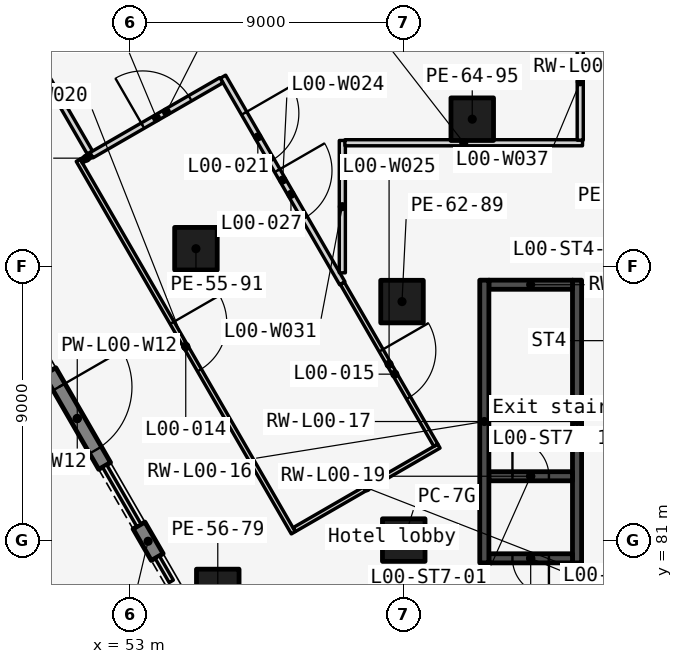
"""IFC4 building model, lengths in metres.
Left out: names, types, materials, properties, quantities, classifications, styles, units other than length and angle.
Written with IfcOpenShell. Run it as: python <this file> out.ifc"""

import sys

from ifc_helpers import new_model, si_unit, direction, frame, frame_2d, origin, origin_2d, place, context, subcontext, project, spatial, rectangle, extrude, element, fill, save


model = new_model("IFC4")
c1 = context("Model", 3, precision=1e-05, world=origin(), true_north=direction((0.0, 1.0)))
c2 = subcontext(c1, "Body", "Model", "MODEL_VIEW")
j1 = project(units=[si_unit("LENGTHUNIT", "METRE"), si_unit("PLANEANGLEUNIT", "RADIAN")], contexts=[c1])
p1 = place(None, origin())
s1 = spatial("IfcSite", under=j1, at=p1, CompositionType="ELEMENT")
p2 = place(p1, origin())
s2 = spatial("IfcBuilding", under=s1, at=p2, CompositionType="ELEMENT")
p3 = place(p2, origin())
s3 = spatial("IfcBuildingStorey", under=s2, at=p3, CompositionType="ELEMENT", Elevation=0.0)
for number, where, z_axis, x_axis in (
    (1, (62.0, 81.0, 0.0), (0.0, 0.0, 1.0), (1.0, 0.0, 0.0)),
    (2, (55.165, 90.585, 0.0), (0.0, 0.0, 1.0), (1.0, 0.0, 0.0)),
    (3, (55.883, 79.343, 0.0), (0.0, 0.0, 1.0), (1.0, 0.0, 0.0)),
    (4, (61.943, 88.845, 0.0), (0.0, 0.0, 1.0), (1.0, 0.0, 0.0)),
    (5, (64.253, 94.845, 0.0), (0.0, 0.0, 1.0), (1.0, 0.0, 0.0)),
):
    element("IfcColumn", number, at=place(p3, frame(where, z_axis=z_axis, x_axis=x_axis)), inside=s3, PredefinedType="COLUMN", context=c2, shape_type="SweptSolid", body=[
        extrude(rectangle(XDim=1.4, YDim=1.4, at=origin_2d()), origin(), (0.0, 0.0, 1.0), 7.5),
    ])
for number, where, z_axis, x_axis in (
    (6, (64.65, 80.25, 0.0), (0.0, 0.0, 1.0), (0.0, 1.0, 0.0)),
    (7, (67.7, 80.25, 0.0), (0.0, 0.0, 1.0), (0.0, 1.0, 0.0)),
):
    element("IfcWall", number, at=place(p3, frame(where, z_axis=z_axis, x_axis=x_axis)), inside=s3, PredefinedType="SOLIDWALL", context=c2, shape_type="SweptSolid", body=[
        extrude(rectangle(XDim=9.3, YDim=0.3, at=frame_2d((4.65, 0.0))), origin(), (0.0, 0.0, 1.0), 7.2),
    ])
p4 = place(p3, frame((64.8, 80.4, 0.0), z_axis=(0.0, 0.0, 1.0), x_axis=(1.0, 0.0, 0.0)))
e8 = element("IfcWall", 8, at=p4, inside=s3, PredefinedType="SOLIDWALL", context=c2, shape_type="SweptSolid", body=[
    extrude(rectangle(XDim=2.75, YDim=0.3, at=frame_2d((1.375, 0.0))), origin(), (0.0, 0.0, 1.0), 7.2),
])
p5 = place(p4, frame((0.775, 0.0, 0.0)))
e9 = element("IfcOpeningElement", 9, at=p5, cuts=e8, PredefinedType="OPENING", context=c2, shape_type="SweptSolid", body=[
    extrude(rectangle(XDim=1.2, YDim=2.1, at=frame_2d((0.6, 1.05))), frame((0.0, 0.16, 0.0), z_axis=(0.0, -1.0, 0.0), x_axis=(1.0, 0.0, 0.0)), (0.0, 0.0, 1.0), 0.32),
])
p6 = place(p3, frame((64.8, 83.1, 0.0), z_axis=(0.0, 0.0, 1.0), x_axis=(1.0, 0.0, 0.0)))
e10 = element("IfcWall", 10, at=p6, inside=s3, PredefinedType="SOLIDWALL", context=c2, shape_type="SweptSolid", body=[
    extrude(rectangle(XDim=2.75, YDim=0.3, at=frame_2d((1.375, 0.0))), origin(), (0.0, 0.0, 1.0), 7.2),
])
p7 = place(p6, frame((0.775, 0.0, 0.0)))
e11 = element("IfcOpeningElement", 11, at=p7, cuts=e10, PredefinedType="OPENING", context=c2, shape_type="SweptSolid", body=[
    extrude(rectangle(XDim=1.2, YDim=2.1, at=frame_2d((0.6, 1.05))), frame((0.0, 0.16, 0.0), z_axis=(0.0, -1.0, 0.0), x_axis=(1.0, 0.0, 0.0)), (0.0, 0.0, 1.0), 0.32),
])
p8 = place(p3, frame((64.8, 89.4, 0.0), z_axis=(0.0, 0.0, 1.0), x_axis=(1.0, 0.0, 0.0)))
e12 = element("IfcWall", 12, at=p8, inside=s3, PredefinedType="SOLIDWALL", context=c2, shape_type="SweptSolid", body=[
    extrude(rectangle(XDim=2.75, YDim=0.3, at=frame_2d((1.375, 0.0))), origin(), (0.0, 0.0, 1.0), 7.2),
])
p9 = place(p3, frame((50.361, 86.557, -0.3), z_axis=(0.0, 0.0, 1.0), x_axis=(0.500012057535, -0.866018442252, 0.0)))
e13 = element("IfcWall", 13, at=p9, inside=s3, PredefinedType="SOLIDWALL", context=c2, shape_type="SweptSolid", body=[
    extrude(rectangle(XDim=3.6, YDim=0.45, at=frame_2d((1.8, 0.0))), origin(), (0.0, 0.0, 1.0), 6.812),
])
p10 = place(p9, frame((0.6, 0.0, 0.3)))
e14 = element("IfcOpeningElement", 14, at=p10, cuts=e13, PredefinedType="OPENING", context=c2, shape_type="SweptSolid", body=[
    extrude(rectangle(XDim=2.4, YDim=3.0, at=frame_2d((1.2, 1.5))), frame((0.0, 0.235, 0.0), z_axis=(0.0, -1.0, 0.0), x_axis=(1.0, 0.0, 0.0)), (0.0, 0.0, 1.0), 0.47),
])
p11 = place(p3, frame((53.292, 81.481, -0.3), z_axis=(0.0, 0.0, 1.0), x_axis=(0.499880961361, -0.866094119867, 0.0)))
e15 = element("IfcWall", 15, at=p11, inside=s3, PredefinedType="SOLIDWALL", context=c2, shape_type="SweptSolid", body=[
    extrude(rectangle(XDim=1.2, YDim=0.45, at=frame_2d((0.6, 0.0))), origin(), (0.0, 0.0, 1.0), 6.812),
])
p12 = place(p3, frame((51.292, 93.494, 0.0), z_axis=(0.0, 0.0, 1.0), x_axis=(0.500006218857, -0.866021813296, 0.0)))
e16 = element("IfcWall", 16, at=p12, inside=s3, PredefinedType="PARTITIONING", context=c2, shape_type="SweptSolid", body=[
    extrude(rectangle(XDim=14.15, YDim=0.15, at=frame_2d((7.075, 0.0))), origin(), (0.0, 0.0, 1.0), 7.2),
])
p13 = place(p12, frame((6.175, 0.0, 0.0)))
e17 = element("IfcOpeningElement", 17, at=p13, cuts=e16, PredefinedType="OPENING", context=c2, shape_type="SweptSolid", body=[
    extrude(rectangle(XDim=1.8, YDim=2.1, at=frame_2d((0.9, 1.05))), frame((0.0, 0.085, 0.0), z_axis=(0.0, -1.0, 0.0), x_axis=(1.0, 0.0, 0.0)), (0.0, 0.0, 1.0), 0.17),
])
p14 = place(p3, frame((58.403, 81.347, 0.0), z_axis=(0.0, 0.0, 1.0), x_axis=(0.866012292785, 0.50002270823, 0.0)))
e18 = element("IfcWall", 18, at=p14, inside=s3, PredefinedType="PARTITIONING", context=c2, shape_type="SweptSolid", body=[
    extrude(rectangle(XDim=5.49, YDim=0.15, at=frame_2d((2.745, 0.0))), origin(), (0.0, 0.0, 1.0), 7.2),
])
p15 = place(p3, frame((56.055, 96.244, 0.0), z_axis=(0.0, 0.0, 1.0), x_axis=(0.500009653465, -0.866019830282, 0.0)))
e19 = element("IfcWall", 19, at=p15, inside=s3, PredefinedType="PARTITIONING", context=c2, shape_type="SweptSolid", body=[
    extrude(rectangle(XDim=7.849, YDim=0.2, at=frame_2d((3.924, 0.0))), origin(), (0.0, 0.0, 1.0), 7.2),
])
p16 = place(p15, frame((1.39, 0.0, 0.0)))
e20 = element("IfcOpeningElement", 20, at=p16, cuts=e19, PredefinedType="OPENING", context=c2, shape_type="SweptSolid", body=[
    extrude(rectangle(XDim=1.8, YDim=2.1, at=frame_2d((0.9, 1.05))), frame((0.0, 0.11, 0.0), z_axis=(0.0, -1.0, 0.0), x_axis=(1.0, 0.0, 0.0)), (0.0, 0.0, 1.0), 0.22),
])
p17 = place(p15, frame((3.569, 0.0, 0.0)))
e21 = element("IfcOpeningElement", 21, at=p17, cuts=e19, PredefinedType="OPENING", context=c2, shape_type="SweptSolid", body=[
    extrude(rectangle(XDim=1.8, YDim=2.1, at=frame_2d((0.9, 1.05))), frame((0.0, 0.11, 0.0), z_axis=(0.0, -1.0, 0.0), x_axis=(1.0, 0.0, 0.0)), (0.0, 0.0, 1.0), 0.22),
])
p18 = place(p3, frame((59.98, 89.446, 0.0), z_axis=(0.0, 0.0, 1.0), x_axis=(0.499981299016, -0.866036200534, 0.0)))
e22 = element("IfcWall", 22, at=p18, inside=s3, PredefinedType="PARTITIONING", context=c2, shape_type="SweptSolid", body=[
    extrude(rectangle(XDim=6.151, YDim=0.15, at=frame_2d((3.075, 0.0))), origin(), (0.0, 0.0, 1.0), 7.2),
])
p19 = place(p18, frame((2.55, 0.0, 0.0)))
e23 = element("IfcOpeningElement", 23, at=p19, cuts=e22, PredefinedType="OPENING", context=c2, shape_type="SweptSolid", body=[
    extrude(rectangle(XDim=1.8, YDim=2.1, at=frame_2d((0.9, 1.05))), frame((0.0, 0.085, 0.0), z_axis=(0.0, -1.0, 0.0), x_axis=(1.0, 0.0, 0.0)), (0.0, 0.0, 1.0), 0.17),
])
p20 = place(p3, frame((51.395, 93.467, 0.0), z_axis=(0.0, 0.0, 1.0), x_axis=(0.865932188957, 0.500161418072, 0.0)))
e24 = element("IfcWall", 24, at=p20, inside=s3, PredefinedType="PARTITIONING", context=c2, shape_type="SweptSolid", body=[
    extrude(rectangle(XDim=0.385, YDim=0.15, at=frame_2d((0.192, 0.0))), origin(), (0.0, 0.0, 1.0), 7.2),
])
p21 = place(p3, frame((39.107, 115.5, 0.0), z_axis=(0.0, 0.0, 1.0), x_axis=(0.500342688238, -0.865827462215, 0.0)))
e25 = element("IfcWall", 25, at=p21, inside=s3, PredefinedType="PARTITIONING", context=c2, shape_type="SweptSolid", body=[
    extrude(rectangle(XDim=25.12, YDim=0.2, at=frame_2d((12.56, 0.0))), origin(), (0.0, 0.0, 1.0), 7.2),
])
p22 = place(p3, frame((59.98, 89.791, 0.0), z_axis=(0.0, 0.0, 1.0), x_axis=(0.0, 1.0, 0.0)))
e26 = element("IfcWall", 26, at=p22, inside=s3, PredefinedType="PARTITIONING", context=c2, shape_type="SweptSolid", body=[
    extrude(rectangle(XDim=4.353, YDim=0.2, at=frame_2d((2.177, 0.0))), origin(), (0.0, 0.0, 1.0), 7.2),
])
p23 = place(p3, frame((60.065, 94.07, 0.0), z_axis=(0.0, 0.0, 1.0), x_axis=(0.999999998048, 6.2480475e-05, 0.0)))
e27 = element("IfcWall", 27, at=p23, inside=s3, PredefinedType="PARTITIONING", context=c2, shape_type="SweptSolid", body=[
    extrude(rectangle(XDim=7.815, YDim=0.2, at=frame_2d((3.907, 0.0))), origin(), (0.0, 0.0, 1.0), 7.2),
])
p24 = place(p3, frame((51.728, 93.659, 0.0), z_axis=(0.0, 0.0, 1.0), x_axis=(0.866070254654, 0.499922307967, 0.0)))
e28 = element("IfcWall", 28, at=p24, inside=s3, PredefinedType="PARTITIONING", context=c2, shape_type="SweptSolid", body=[
    extrude(rectangle(XDim=4.935, YDim=0.2, at=frame_2d((2.467, 0.0))), origin(), (0.0, 0.0, 1.0), 7.2),
])
p25 = place(p24, frame((1.948, 0.0, 0.0)))
e29 = element("IfcOpeningElement", 29, at=p25, cuts=e28, PredefinedType="OPENING", context=c2, shape_type="SweptSolid", body=[
    extrude(rectangle(XDim=1.8, YDim=2.1, at=frame_2d((0.9, 1.05))), frame((0.0, 0.11, 0.0), z_axis=(0.0, -1.0, 0.0), x_axis=(1.0, 0.0, 0.0)), (0.0, 0.0, 1.0), 0.22),
])
p26 = place(p3, frame((67.805, 94.155, 0.0), z_axis=(0.0, 0.0, 1.0), x_axis=(0.0, 1.0, 0.0)))
e30 = element("IfcWall", 30, at=p26, inside=s3, PredefinedType="PARTITIONING", context=c2, shape_type="SweptSolid", body=[
    extrude(rectangle(XDim=3.839, YDim=0.2, at=frame_2d((1.92, 0.0))), origin(), (0.0, 0.0, 1.0), 6.339),
])
p27 = place(p7, origin())
e31 = element("IfcDoor", 31, at=p27, inside=s3, OperationType="SINGLE_SWING_LEFT", PredefinedType="DOOR", context=c2, shape_type="SweptSolid", body=[
    extrude(rectangle(XDim=1.2, YDim=2.1, at=frame_2d((0.6, 1.05))), frame((0.0, 0.025, 0.0), z_axis=(0.0, -1.0, 0.0), x_axis=(1.0, 0.0, 0.0)), (0.0, 0.0, 1.0), 0.05),
])
fill(e11, e31)
p28 = place(p5, origin())
e32 = element("IfcDoor", 32, at=p28, inside=s3, OperationType="SINGLE_SWING_RIGHT", PredefinedType="DOOR", context=c2, shape_type="SweptSolid", body=[
    extrude(rectangle(XDim=1.2, YDim=2.1, at=frame_2d((0.6, 1.05))), frame((0.0, 0.025, 0.0), z_axis=(0.0, -1.0, 0.0), x_axis=(1.0, 0.0, 0.0)), (0.0, 0.0, 1.0), 0.05),
])
fill(e9, e32)
p29 = place(p10, origin())
e33 = element("IfcDoor", 33, at=p29, inside=s3, OperationType="DOUBLE_DOOR_SINGLE_SWING", PredefinedType="DOOR", context=c2, shape_type="SweptSolid", body=[
    extrude(rectangle(XDim=2.4, YDim=3.0, at=frame_2d((1.2, 1.5))), frame((0.0, 0.025, 0.0), z_axis=(0.0, -1.0, 0.0), x_axis=(1.0, 0.0, 0.0)), (0.0, 0.0, 1.0), 0.05),
])
fill(e14, e33)
p30 = place(p13, origin())
e34 = element("IfcDoor", 34, at=p30, inside=s3, OperationType="SINGLE_SWING_LEFT", PredefinedType="DOOR", context=c2, shape_type="SweptSolid", body=[
    extrude(rectangle(XDim=1.8, YDim=2.1, at=frame_2d((0.9, 1.05))), frame((0.0, 0.025, 0.0), z_axis=(0.0, -1.0, 0.0), x_axis=(1.0, 0.0, 0.0)), (0.0, 0.0, 1.0), 0.05),
])
fill(e17, e34)
p31 = place(p19, origin())
e35 = element("IfcDoor", 35, at=p31, inside=s3, OperationType="SINGLE_SWING_LEFT", PredefinedType="DOOR", context=c2, shape_type="SweptSolid", body=[
    extrude(rectangle(XDim=1.8, YDim=2.1, at=frame_2d((0.9, 1.05))), frame((0.0, 0.025, 0.0), z_axis=(0.0, -1.0, 0.0), x_axis=(1.0, 0.0, 0.0)), (0.0, 0.0, 1.0), 0.05),
])
fill(e23, e35)
p32 = place(p16, origin())
e36 = element("IfcDoor", 36, at=p32, inside=s3, OperationType="SINGLE_SWING_LEFT", PredefinedType="DOOR", context=c2, shape_type="SweptSolid", body=[
    extrude(rectangle(XDim=1.8, YDim=2.1, at=frame_2d((0.9, 1.05))), frame((0.0, 0.025, 0.0), z_axis=(0.0, -1.0, 0.0), x_axis=(1.0, 0.0, 0.0)), (0.0, 0.0, 1.0), 0.05),
])
fill(e20, e36)
p33 = place(p25, origin())
e37 = element("IfcDoor", 37, at=p33, inside=s3, OperationType="SINGLE_SWING_LEFT", PredefinedType="DOOR", context=c2, shape_type="SweptSolid", body=[
    extrude(rectangle(XDim=1.8, YDim=2.1, at=frame_2d((0.9, 1.05))), frame((0.0, 0.025, 0.0), z_axis=(0.0, -1.0, 0.0), x_axis=(1.0, 0.0, 0.0)), (0.0, 0.0, 1.0), 0.05),
])
fill(e29, e37)
p34 = place(p17, origin())
e38 = element("IfcDoor", 38, at=p34, inside=s3, OperationType="SINGLE_SWING_LEFT", PredefinedType="DOOR", context=c2, shape_type="SweptSolid", body=[
    extrude(rectangle(XDim=1.8, YDim=2.1, at=frame_2d((0.9, 1.05))), frame((0.0, 0.025, 0.0), z_axis=(0.0, -1.0, 0.0), x_axis=(1.0, 0.0, 0.0)), (0.0, 0.0, 1.0), 0.05),
])
fill(e21, e38)
save(model, sys.argv[1])
